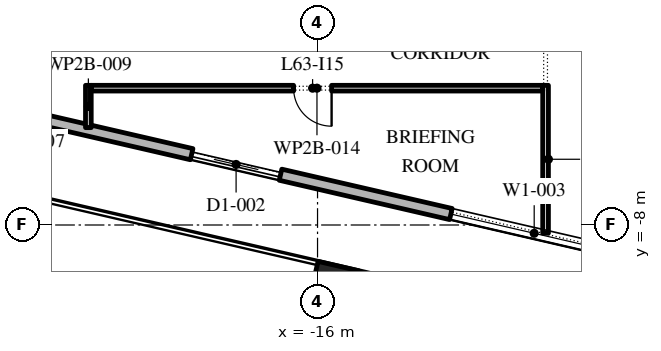
"""IFC4 building model, lengths in metres.
Left out: names, types, materials, properties, quantities, classifications, styles, units other than length and angle.
Written with IfcOpenShell. Run it as: python <this file> out.ifc"""

import sys

from ifc_helpers import new_model, si_unit, direction, frame, frame_2d, origin, origin_2d, place, context, subcontext, project, spatial, rectangle, extrude, element, fill, save


model = new_model("IFC4")
c1 = context("Model", 3, precision=1e-05, world=origin(), true_north=direction((0.0, 1.0)))
c2 = subcontext(c1, "Body", "Model", "MODEL_VIEW")
j1 = project(units=[si_unit("LENGTHUNIT", "METRE"), si_unit("PLANEANGLEUNIT", "RADIAN")], contexts=[c1])
p1 = place(None, origin())
s1 = spatial("IfcSite", under=j1, at=p1, CompositionType="ELEMENT")
p2 = place(p1, origin())
s2 = spatial("IfcBuilding", under=s1, at=p2, CompositionType="ELEMENT")
p3 = place(p2, frame((0.0, 0.0, 289.2)))
s3 = spatial("IfcBuildingStorey", under=s2, at=p3, CompositionType="ELEMENT", Elevation=289.2)
p4 = place(p3, frame((-15.574, -9.617, 0.0), z_axis=(0.0, 0.0, 1.0), x_axis=(0.974370064785, -0.224951054344, 0.0)))
e1 = element("IfcColumn", 1, at=p4, inside=s3, PredefinedType="COLUMN", context=c2, shape_type="SweptSolid", body=[
    extrude(rectangle(XDim=1.1, YDim=1.1, at=origin_2d()), origin(), (0.0, 0.0, 1.0), 4.2),
])
p5 = place(p3, frame((-29.616, -3.758, 0.0), z_axis=(0.0, 0.0, 1.0), x_axis=(0.974370532314, -0.224949029246, 0.0)))
e2 = element("IfcWall", 2, at=p5, inside=s3, PredefinedType="STANDARD", context=c2, shape_type="SweptSolid", body=[
    extrude(rectangle(XDim=48.0, YDim=0.3, at=frame_2d((24.0, 0.0))), origin(), (0.0, 0.0, 1.0), 3.95),
])
p6 = place(p5, frame((1.625, 0.0, 0.45)))
e3 = element("IfcOpeningElement", 3, at=p6, cuts=e2, PredefinedType="OPENING", context=c2, shape_type="SweptSolid", body=[
    extrude(rectangle(XDim=4.5, YDim=3.05, at=frame_2d((2.25, 1.525))), frame((0.0, 0.16, 0.0), z_axis=(0.0, -1.0, 0.0), x_axis=(1.0, 0.0, 0.0)), (0.0, 0.0, 1.0), 0.32),
])
p7 = place(p5, frame((10.575, 0.0, 0.0)))
e4 = element("IfcOpeningElement", 4, at=p7, cuts=e2, PredefinedType="OPENING", context=c2, shape_type="SweptSolid", body=[
    extrude(rectangle(XDim=2.4, YDim=3.5, at=frame_2d((1.2, 1.75))), frame((0.0, 0.16, 0.0), z_axis=(0.0, -1.0, 0.0), x_axis=(1.0, 0.0, 0.0)), (0.0, 0.0, 1.0), 0.32),
])
p8 = place(p5, frame((17.575, 0.0, 0.45)))
e5 = element("IfcOpeningElement", 5, at=p8, cuts=e2, PredefinedType="OPENING", context=c2, shape_type="SweptSolid", body=[
    extrude(rectangle(XDim=4.5, YDim=3.05, at=frame_2d((2.25, 1.525))), frame((0.0, 0.16, 0.0), z_axis=(0.0, -1.0, 0.0), x_axis=(1.0, 0.0, 0.0)), (0.0, 0.0, 1.0), 0.32),
])
p9 = place(p5, frame((25.625, 0.0, 0.45)))
e6 = element("IfcOpeningElement", 6, at=p9, cuts=e2, PredefinedType="OPENING", context=c2, shape_type="SweptSolid", body=[
    extrude(rectangle(XDim=4.5, YDim=2.9, at=frame_2d((2.25, 1.45))), frame((0.0, 0.16, 0.0), z_axis=(0.0, -1.0, 0.0), x_axis=(1.0, 0.0, 0.0)), (0.0, 0.0, 1.0), 0.32),
])
p10 = place(p5, frame((33.675, 0.0, 0.45)))
e7 = element("IfcOpeningElement", 7, at=p10, cuts=e2, PredefinedType="OPENING", context=c2, shape_type="SweptSolid", body=[
    extrude(rectangle(XDim=4.5, YDim=3.05, at=frame_2d((2.25, 1.525))), frame((0.0, 0.16, 0.0), z_axis=(0.0, -1.0, 0.0), x_axis=(1.0, 0.0, 0.0)), (0.0, 0.0, 1.0), 0.32),
])
p11 = place(p5, frame((42.775, 0.0, 0.0)))
e8 = element("IfcOpeningElement", 8, at=p11, cuts=e2, PredefinedType="OPENING", context=c2, shape_type="SweptSolid", body=[
    extrude(rectangle(XDim=2.4, YDim=3.15, at=frame_2d((1.2, 1.575))), frame((0.0, 0.16, 0.0), z_axis=(0.0, -1.0, 0.0), x_axis=(1.0, 0.0, 0.0)), (0.0, 0.0, 1.0), 0.32),
])
p12 = place(p3, frame((-22.03, -4.325, 0.0), z_axis=(0.0, 0.0, 1.0), x_axis=(0.0, -1.0, 0.0)))
e9 = element("IfcWall", 9, at=p12, inside=s3, PredefinedType="PARTITIONING", context=c2, shape_type="SweptSolid", body=[
    extrude(rectangle(XDim=1.113, YDim=0.15, at=frame_2d((0.557, 0.0))), origin(), (0.0, 0.0, 1.0), 3.95),
])
p13 = place(p3, frame((-10.0, -8.216, 0.0), z_axis=(0.0, 0.0, 1.0), x_axis=(0.0, 1.0, 0.0)))
e10 = element("IfcWall", 10, at=p13, inside=s3, PredefinedType="PARTITIONING", context=c2, shape_type="SweptSolid", body=[
    extrude(rectangle(XDim=3.891, YDim=0.15, at=frame_2d((1.946, 0.0))), origin(), (0.0, 0.0, 1.0), 3.95),
])
p14 = place(p3, frame((-10.075, -4.4, 0.0), z_axis=(0.0, 0.0, 1.0), x_axis=(-1.0, 0.0, 0.0)))
e11 = element("IfcWall", 11, at=p14, inside=s3, PredefinedType="PARTITIONING", context=c2, shape_type="SweptSolid", body=[
    extrude(rectangle(XDim=11.88, YDim=0.15, at=frame_2d((5.94, 0.0))), origin(), (0.0, 0.0, 1.0), 3.95),
])
p15 = place(p14, frame((5.555, 0.0, 0.0)))
e12 = element("IfcOpeningElement", 12, at=p15, cuts=e11, PredefinedType="OPENING", context=c2, shape_type="SweptSolid", body=[
    extrude(rectangle(XDim=1.0, YDim=2.1, at=frame_2d((0.5, 1.05))), frame((0.0, 0.085, 0.0), z_axis=(0.0, -1.0, 0.0), x_axis=(1.0, 0.0, 0.0)), (0.0, 0.0, 1.0), 0.17),
])
p16 = place(p7, origin())
e13 = element("IfcDoor", 13, at=p16, inside=s3, OperationType="DOUBLE_DOOR_SLIDING", PredefinedType="DOOR", context=c2, shape_type="SweptSolid", body=[
    extrude(rectangle(XDim=2.4, YDim=3.5, at=frame_2d((1.2, 1.75))), frame((0.0, 0.025, 0.0), z_axis=(0.0, -1.0, 0.0), x_axis=(1.0, 0.0, 0.0)), (0.0, 0.0, 1.0), 0.05),
])
fill(e4, e13)
p17 = place(p8, origin())
e14 = element("IfcWindow", 14, at=p17, inside=s3, PartitioningType="DOUBLE_PANEL_VERTICAL", PredefinedType="WINDOW", context=c2, shape_type="SweptSolid", body=[
    extrude(rectangle(XDim=4.5, YDim=3.05, at=frame_2d((2.25, 1.525))), frame((0.0, 0.03, 0.0), z_axis=(0.0, -1.0, 0.0), x_axis=(1.0, 0.0, 0.0)), (0.0, 0.0, 1.0), 0.06),
])
fill(e5, e14)
p18 = place(p15, origin())
e15 = element("IfcDoor", 15, at=p18, inside=s3, OperationType="SINGLE_SWING_RIGHT", PredefinedType="DOOR", context=c2, shape_type="SweptSolid", body=[
    extrude(rectangle(XDim=1.0, YDim=2.1, at=frame_2d((0.5, 1.05))), frame((0.0, 0.025, 0.0), z_axis=(0.0, -1.0, 0.0), x_axis=(1.0, 0.0, 0.0)), (0.0, 0.0, 1.0), 0.05),
])
fill(e12, e15)
save(model, sys.argv[1])
